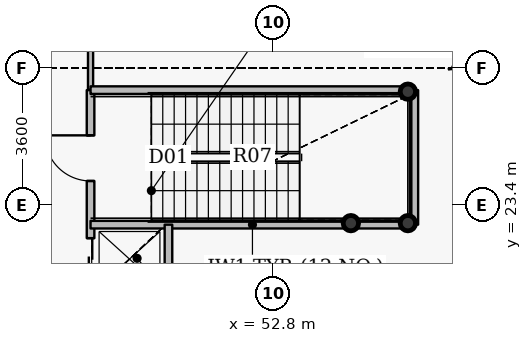
"""IFC4 building model, lengths in metres.
Left out: names, types, materials, properties, quantities, classifications, styles, units other than length and angle.
Written with IfcOpenShell. Run it as: python <this file> out.ifc"""

import sys

from ifc_helpers import new_model, si_unit, direction, frame, frame_2d, origin, origin_2d, place, context, subcontext, project, spatial, rectangle, hollow_circle, extrude, source, transform, mapped, element, fill, save


model = new_model("IFC4")
c1 = context("Model", 3, precision=1e-05, world=origin(), true_north=direction((0.0, 1.0)))
c2 = subcontext(c1, "Body", "Model", "MODEL_VIEW")
j1 = project(units=[si_unit("LENGTHUNIT", "METRE"), si_unit("PLANEANGLEUNIT", "RADIAN")], contexts=[c1])
p1 = place(None, origin())
s1 = spatial("IfcSite", under=j1, at=p1, CompositionType="ELEMENT")
p2 = place(p1, origin())
s2 = spatial("IfcBuilding", under=s1, at=p2, CompositionType="ELEMENT")
p3 = place(p2, frame((0.0, 0.0, 32.4)))
s3 = spatial("IfcBuildingStorey", under=s2, at=p3, CompositionType="ELEMENT", Elevation=32.4)
for number, where, z_axis, x_axis in (
    (1, (56.35, 26.38, 0.0), (0.0, 0.0, 1.0), (1.0, 0.0, 0.0)),
    (2, (56.35, 22.92, 0.0), (0.0, 0.0, 1.0), (1.0, 0.0, 0.0)),
    (3, (54.85, 22.92, 0.0), (0.0, 0.0, 1.0), (1.0, 0.0, 0.0)),
):
    element("IfcColumn", number, at=place(p3, frame(where, z_axis=z_axis, x_axis=x_axis)), inside=s3, PredefinedType="COLUMN", context=c2, shape_type="SweptSolid", body=[
        extrude(hollow_circle(Radius=0.203, WallThickness=0.016, at=origin_2d()), origin(), (0.0, 0.0, 1.0), 4.2),
    ])
p4 = place(p3, frame((48.0, 21.01, 0.0), z_axis=(0.0, 0.0, 1.0), x_axis=(0.0, 1.0, 0.0)))
e4 = element("IfcWall", 4, at=p4, inside=s3, PredefinedType="PARTITIONING", context=c2, shape_type="SweptSolid", body=[
    extrude(rectangle(XDim=5.41, YDim=0.2, at=frame_2d((2.705, 0.0))), origin(), (0.0, 0.0, 1.0), 3.285),
])
p5 = place(p4, frame((3.02, 0.0, 0.0)))
e5 = element("IfcOpeningElement", 5, at=p5, cuts=e4, PredefinedType="OPENING", context=c2, shape_type="SweptSolid", body=[
    extrude(rectangle(XDim=1.2, YDim=2.15, at=origin_2d()), frame((0.6, 0.11, 1.075), z_axis=(0.0, -1.0, 0.0), x_axis=(1.0, 0.0, 0.0)), (0.0, 0.0, 1.0), 0.22),
])
p6 = place(p4, frame((0.465, 0.0, 0.0)))
e6 = element("IfcOpeningElement", 6, at=p6, cuts=e4, PredefinedType="OPENING", context=c2, shape_type="SweptSolid", body=[
    extrude(rectangle(XDim=1.05, YDim=2.15, at=origin_2d()), frame((0.525, 0.11, 1.075), z_axis=(0.0, -1.0, 0.0), x_axis=(1.0, 0.0, 0.0)), (0.0, 0.0, 1.0), 0.22),
])
p7 = place(p3, frame((48.0, 22.88, 0.0), z_axis=(0.0, 0.0, 1.0), x_axis=(1.0, 0.0, 0.0)))
e7 = element("IfcWall", 7, at=p7, inside=s3, PredefinedType="PARTITIONING", context=c2, shape_type="SweptSolid", body=[
    extrude(rectangle(XDim=8.52, YDim=0.2, at=frame_2d((4.26, 0.0))), origin(), (0.0, 0.0, 1.0), 3.95),
])
p8 = place(p3, frame((48.0, 26.43, 0.0), z_axis=(0.0, 0.0, 1.0), x_axis=(0.0, 1.0, 0.0)))
e8 = element("IfcWall", 8, at=p8, inside=s3, PredefinedType="PARTITIONING", context=c2, shape_type="SweptSolid", body=[
    extrude(rectangle(XDim=14.77, YDim=0.135, at=frame_2d((7.385, 0.0))), origin(), (0.0, 0.0, 1.0), 3.285),
])
p9 = place(p8, frame((6.86, 0.0, 0.0)))
e9 = element("IfcOpeningElement", 9, at=p9, cuts=e8, PredefinedType="OPENING", context=c2, shape_type="SweptSolid", body=[
    extrude(rectangle(XDim=1.05, YDim=2.15, at=origin_2d()), frame((0.525, 0.078, 1.075), z_axis=(0.0, -1.0, 0.0), x_axis=(1.0, 0.0, 0.0)), (0.0, 0.0, 1.0), 0.155),
])
p10 = place(p3, frame((48.0, 26.42, 0.0), z_axis=(0.0, 0.0, 1.0), x_axis=(1.0, 0.0, 0.0)))
e10 = element("IfcWall", 10, at=p10, inside=s3, PredefinedType="PARTITIONING", context=c2, shape_type="SweptSolid", body=[
    extrude(rectangle(XDim=8.52, YDim=0.2, at=frame_2d((4.26, 0.0))), origin(), (0.0, 0.0, 1.0), 3.95),
])
p11 = place(p3, frame((50.05, 21.0, 0.0), z_axis=(0.0, 0.0, 1.0), x_axis=(0.0, 1.0, 0.0)))
e11 = element("IfcWall", 11, at=p11, inside=s3, PredefinedType="PARTITIONING", context=c2, shape_type="SweptSolid", body=[
    extrude(rectangle(XDim=1.88, YDim=0.2, at=frame_2d((0.94, 0.0))), origin(), (0.0, 0.0, 1.0), 3.285),
])
p12 = place(p3, frame((56.52, 22.88, 0.0), z_axis=(0.0, 0.0, 1.0), x_axis=(0.0, 1.0, 0.0)))
e12 = element("IfcWall", 12, at=p12, inside=s3, PredefinedType="PARTITIONING", context=c2, shape_type="SweptSolid", body=[
    extrude(rectangle(XDim=3.54, YDim=0.2, at=frame_2d((1.77, 0.0))), origin(), (0.0, 0.0, 1.0), 3.95),
])
m1 = source(origin(), c2, "Body", "SweptSolid", [
    extrude(rectangle(XDim=1.2, YDim=2.15, at=origin_2d()), frame((0.6, 0.025, 1.075), z_axis=(0.0, -1.0, 0.0), x_axis=(1.0, 0.0, 0.0)), (0.0, 0.0, 1.0), 0.05),
])
p13 = place(p5, origin())
e13 = element("IfcDoor", 13, at=p13, inside=s3, OperationType="SINGLE_SWING_RIGHT", PredefinedType="DOOR", context=c2, shape_type="MappedRepresentation", body=[
    mapped(m1, transform((0.0, 0.0, 0.0), x_axis=(1.0, 0.0, 0.0), y_axis=(0.0, 1.0, 0.0), z_axis=(0.0, 0.0, 1.0), scale=1.0)),
])
fill(e5, e13)
m2 = source(origin(), c2, "Body", "SweptSolid", [
    extrude(rectangle(XDim=1.05, YDim=2.15, at=origin_2d()), frame((0.525, 0.025, 1.075), z_axis=(0.0, -1.0, 0.0), x_axis=(1.0, 0.0, 0.0)), (0.0, 0.0, 1.0), 0.05),
])
p14 = place(p6, origin())
e14 = element("IfcDoor", 14, at=p14, inside=s3, OperationType="DOUBLE_DOOR_SLIDING", PredefinedType="USERDEFINED", context=c2, shape_type="MappedRepresentation", body=[
    mapped(m2, transform((0.0, 0.0, 0.0), x_axis=(1.0, 0.0, 0.0), y_axis=(0.0, 1.0, 0.0), z_axis=(0.0, 0.0, 1.0), scale=1.0)),
])
fill(e6, e14)
save(model, sys.argv[1])
